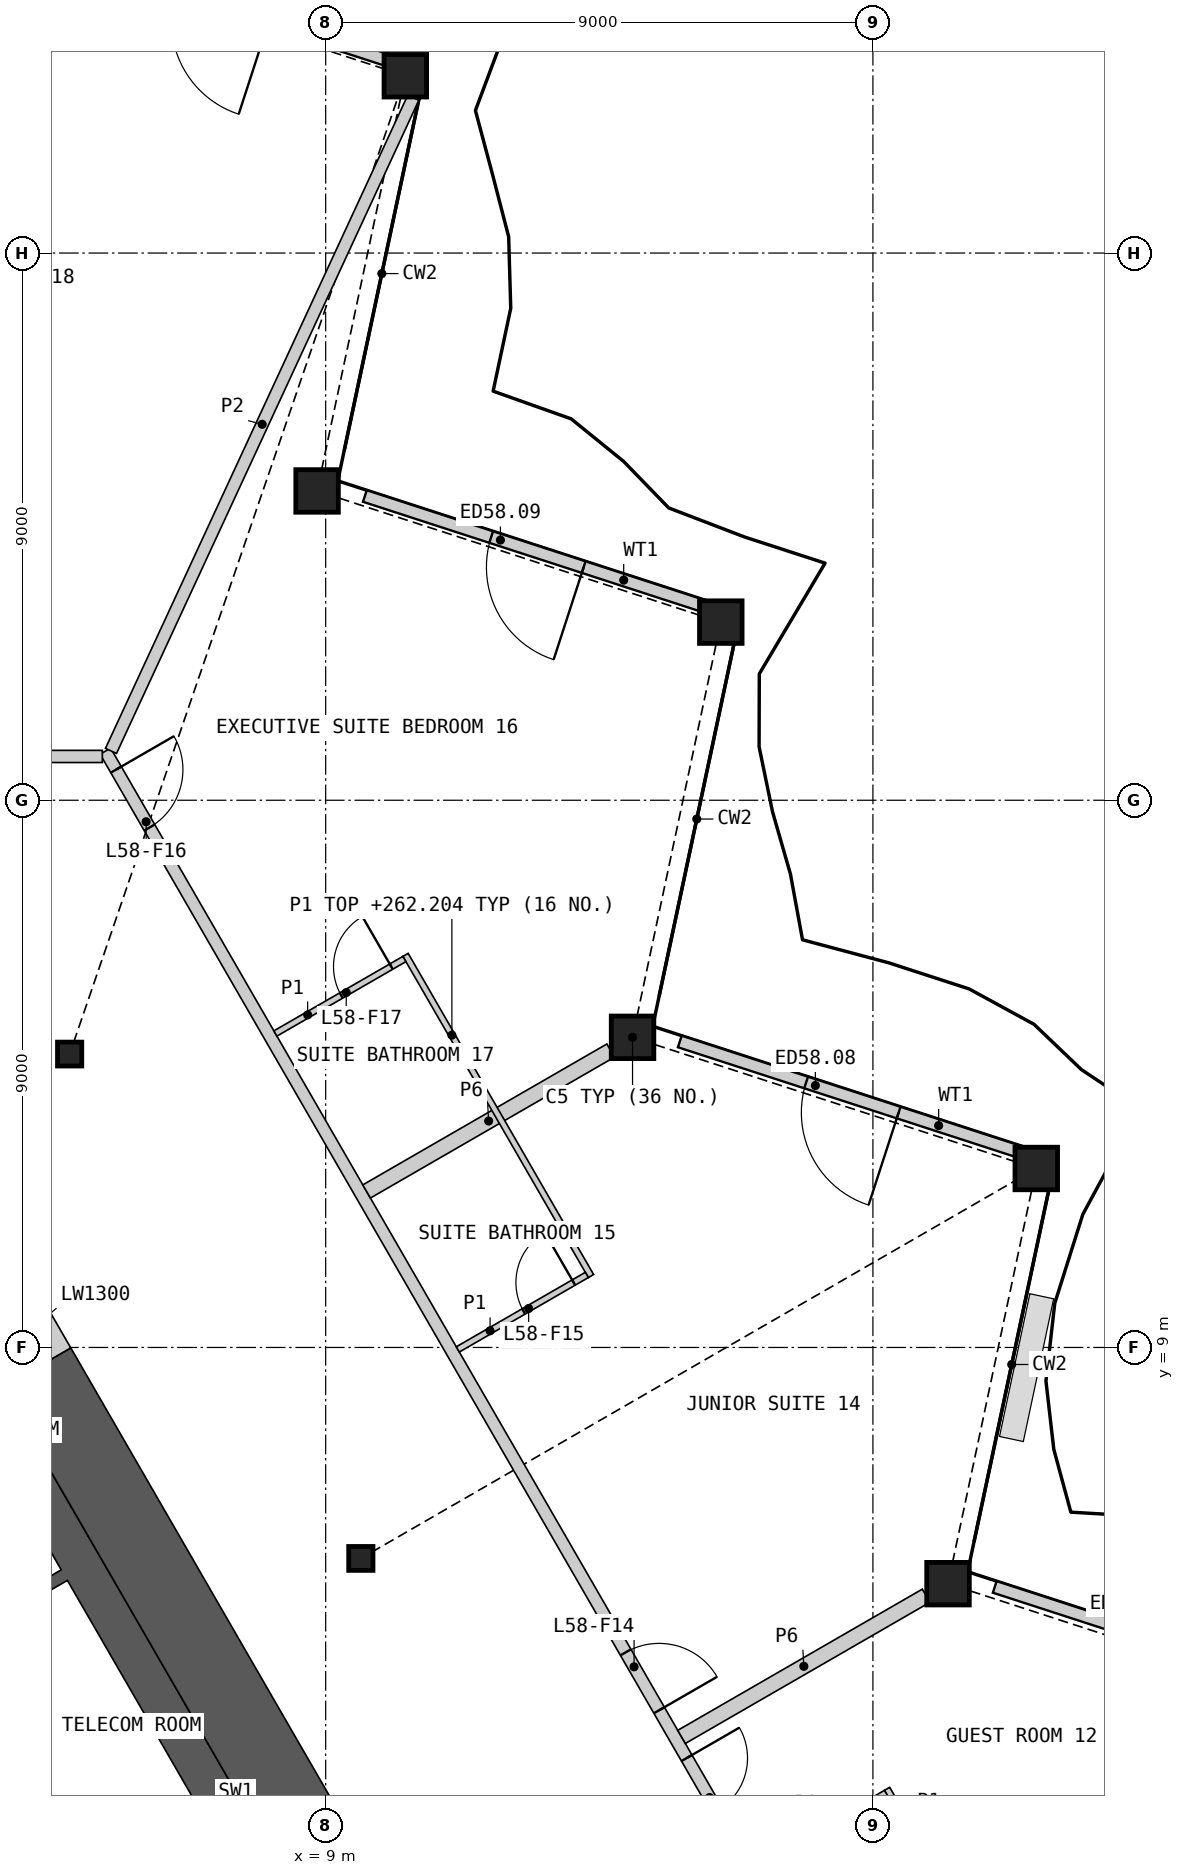
"""IFC4 building model, lengths in metres.
Left out: names, types, materials, properties, quantities, classifications, styles, units other than length and angle.
Written with IfcOpenShell. Run it as: python <this file> out.ifc"""

import sys

from ifc_helpers import new_model, si_unit, direction, frame, frame_2d, origin, origin_2d, place, context, subcontext, project, spatial, polyline, rectangle, hollow_rectangle, i_section, outline, extrude, element, fill, save


model = new_model("IFC4")
c1 = context("Model", 3, precision=1e-05, world=origin(), true_north=direction((0.0, 1.0)))
c2 = subcontext(c1, "Body", "Model", "MODEL_VIEW")
j1 = project(units=[si_unit("LENGTHUNIT", "METRE"), si_unit("PLANEANGLEUNIT", "RADIAN")], contexts=[c1])
p1 = place(None, origin())
s1 = spatial("IfcSite", under=j1, at=p1, CompositionType="ELEMENT")
p2 = place(p1, origin())
s2 = spatial("IfcBuilding", under=s1, at=p2, CompositionType="ELEMENT")
p3 = place(p2, frame((0.0, 0.0, 259.8)))
s3 = spatial("IfcBuildingStorey", under=s2, at=p3, CompositionType="ELEMENT", Elevation=259.8)
for number, where, z_axis, x_axis in (
    (1, (19.235, 5.115, 0.0), (0.0, 0.0, 1.0), (1.0, 0.0, 0.0)),
    (2, (20.687, 11.943, 0.0), (0.0, 0.0, 1.0), (1.0, 0.0, 0.0)),
    (3, (14.047, 14.101, 0.0), (0.0, 0.0, 1.0), (1.0, 0.0, 0.0)),
    (4, (15.499, 20.93, 0.0), (0.0, 0.0, 1.0), (1.0, 0.0, 0.0)),
    (5, (8.859, 23.087, 0.0), (0.0, 0.0, 1.0), (1.0, 0.0, 0.0)),
    (6, (10.31, 29.916, 0.0), (0.0, 0.0, 1.0), (1.0, 0.0, 0.0)),
):
    element("IfcColumn", number, at=place(p3, frame(where, z_axis=z_axis, x_axis=x_axis)), inside=s3, PredefinedType="COLUMN", context=c2, shape_type="SweptSolid", body=[
        extrude(hollow_rectangle(XDim=0.7, YDim=0.7, WallThickness=0.045, at=origin_2d()), origin(), (0.0, 0.0, 1.0), 3.6),
    ])
for number, where, z_axis, x_axis in (
    (7, (9.578, 5.53, 0.0), (0.0, 0.0, 1.0), (1.0, 0.0, 0.0)),
    (8, (4.789, 13.825, 0.0), (0.0, 0.0, 1.0), (1.0, 0.0, 0.0)),
):
    element("IfcColumn", number, at=place(p3, frame(where, z_axis=z_axis, x_axis=x_axis)), inside=s3, PredefinedType="COLUMN", context=c2, shape_type="SweptSolid", body=[
        extrude(i_section(OverallWidth=0.399, OverallDepth=0.393, WebThickness=0.023, FlangeThickness=0.037, at=origin_2d()), origin(), (0.0, 0.0, 1.0), 3.6),
    ])
p4 = place(p3, frame((25.679, 3.217, 0.0), z_axis=(0.0, 0.0, 1.0), x_axis=(-0.951049400374, 0.309038894069, 0.0)))
e9 = element("IfcWall", 9, at=p4, inside=s3, PredefinedType="SOLIDWALL", context=c2, shape_type="SweptSolid", body=[
    extrude(rectangle(XDim=5.968, YDim=0.2, at=frame_2d((2.984, 0.0))), origin(), (0.0, 0.0, 1.0), 2.701),
])
p5 = place(p4, frame((2.184, 0.0, 0.0)))
e10 = element("IfcOpeningElement", 10, at=p5, cuts=e9, PredefinedType="OPENING", context=c2, shape_type="SweptSolid", body=[
    extrude(rectangle(XDim=1.6, YDim=2.4, at=frame_2d((0.8, 1.2))), frame((0.0, 0.11, 0.0), z_axis=(0.0, -1.0, 0.0), x_axis=(1.0, 0.0, 0.0)), (0.0, 0.0, 1.0), 0.22),
])
p6 = place(p3, frame((20.5, 12.188, 0.0), z_axis=(0.0, 0.0, 1.0), x_axis=(-0.951053307318, 0.309026870418, 0.0)))
e11 = element("IfcWall", 11, at=p6, inside=s3, PredefinedType="SOLIDWALL", context=c2, shape_type="SweptSolid", body=[
    extrude(rectangle(XDim=5.968, YDim=0.2, at=frame_2d((2.984, 0.0))), origin(), (0.0, 0.0, 1.0), 2.701),
])
p7 = place(p6, frame((2.184, 0.0, 0.0)))
e12 = element("IfcOpeningElement", 12, at=p7, cuts=e11, PredefinedType="OPENING", context=c2, shape_type="SweptSolid", body=[
    extrude(rectangle(XDim=1.6, YDim=2.4, at=frame_2d((0.8, 1.2))), frame((0.0, 0.11, 0.0), z_axis=(0.0, -1.0, 0.0), x_axis=(1.0, 0.0, 0.0)), (0.0, 0.0, 1.0), 0.22),
])
p8 = place(p3, frame((15.321, 21.159, 0.0), z_axis=(0.0, 0.0, 1.0), x_axis=(-0.951053307318, 0.309026870418, 0.0)))
e13 = element("IfcWall", 13, at=p8, inside=s3, PredefinedType="SOLIDWALL", context=c2, shape_type="SweptSolid", body=[
    extrude(rectangle(XDim=5.968, YDim=0.2, at=frame_2d((2.984, 0.0))), origin(), (0.0, 0.0, 1.0), 2.701),
])
p9 = place(p8, frame((2.184, 0.0, 0.0)))
e14 = element("IfcOpeningElement", 14, at=p9, cuts=e13, PredefinedType="OPENING", context=c2, shape_type="SweptSolid", body=[
    extrude(rectangle(XDim=1.6, YDim=2.4, at=frame_2d((0.8, 1.2))), frame((0.0, 0.11, 0.0), z_axis=(0.0, -1.0, 0.0), x_axis=(1.0, 0.0, 0.0)), (0.0, 0.0, 1.0), 0.22),
])
p10 = place(p3, frame((10.141, 30.131, 0.0), z_axis=(0.0, 0.0, 1.0), x_axis=(-0.951049400374, 0.309038894069, 0.0)))
e15 = element("IfcWall", 15, at=p10, inside=s3, PredefinedType="SOLIDWALL", context=c2, shape_type="SweptSolid", body=[
    extrude(rectangle(XDim=5.968, YDim=0.2, at=frame_2d((2.984, 0.0))), origin(), (0.0, 0.0, 1.0), 2.701),
])
p11 = place(p10, frame((2.184, 0.0, 0.0)))
e16 = element("IfcOpeningElement", 16, at=p11, cuts=e15, PredefinedType="OPENING", context=c2, shape_type="SweptSolid", body=[
    extrude(rectangle(XDim=1.6, YDim=2.4, at=frame_2d((0.8, 1.2))), frame((0.0, 0.11, 0.0), z_axis=(0.0, -1.0, 0.0), x_axis=(1.0, 0.0, 0.0)), (0.0, 0.0, 1.0), 0.22),
])
p12 = place(p3, origin())
e17 = element("IfcWall", 17, at=p12, inside=s3, PredefinedType="SHEAR", context=c2, shape_type="SweptSolid", body=[
    extrude(outline(polyline([(7.524, 1.688), (7.131, 1.461), (4.96, 0.208), (4.861, 0.381), (6.852, 1.531), (4.752, 5.169), (2.76, 4.019), (2.66, 4.192), (4.652, 5.342), (3.652, 7.074), (1.66, 5.924), (1.561, 6.097), (3.731, 7.35), (4.124, 7.577), (7.524, 1.688)])), origin(), (0.0, 0.0, 1.0), 3.25),
])
p13 = place(p3, frame((5.817, -1.476, 0.0), z_axis=(0.0, 0.0, 1.0), x_axis=(-0.500002616675, 0.866023893041, 0.0)))
e18 = element("IfcWall", 18, at=p13, inside=s3, PredefinedType="SOLIDWALL", context=c2, shape_type="SweptSolid", body=[
    extrude(rectangle(XDim=8.373, YDim=0.2, at=frame_2d((4.187, 0.0))), origin(), (0.0, 0.0, 1.0), 3.25),
])
p14 = place(p13, frame((0.437, 0.0, 0.0)))
e19 = element("IfcOpeningElement", 19, at=p14, cuts=e18, PredefinedType="OPENING", context=c2, shape_type="SweptSolid", body=[
    extrude(rectangle(XDim=0.9, YDim=2.1, at=frame_2d((0.45, 1.05))), frame((0.0, 0.11, 0.0), z_axis=(0.0, -1.0, 0.0), x_axis=(1.0, 0.0, 0.0)), (0.0, 0.0, 1.0), 0.22),
])
p15 = place(p13, frame((3.737, 0.0, 0.0)))
e20 = element("IfcOpeningElement", 20, at=p15, cuts=e18, PredefinedType="OPENING", context=c2, shape_type="SweptSolid", body=[
    extrude(rectangle(XDim=0.9, YDim=2.1, at=frame_2d((0.45, 1.05))), frame((0.0, 0.11, 0.0), z_axis=(0.0, -1.0, 0.0), x_axis=(1.0, 0.0, 0.0)), (0.0, 0.0, 1.0), 0.22),
])
p16 = place(p13, frame((6.937, 0.0, 0.0)))
e21 = element("IfcOpeningElement", 21, at=p16, cuts=e18, PredefinedType="OPENING", context=c2, shape_type="SweptSolid", body=[
    extrude(rectangle(XDim=1.1, YDim=2.1, at=frame_2d((0.55, 1.05))), frame((0.0, 0.11, 0.0), z_axis=(0.0, -1.0, 0.0), x_axis=(1.0, 0.0, 0.0)), (0.0, 0.0, 1.0), 0.22),
])
p17 = place(p3, frame((10.081, -1.441, 0.0), z_axis=(0.0, 0.0, 1.0), x_axis=(-0.500006109471, 0.866021876451, 0.0)))
e22 = element("IfcWall", 22, at=p17, inside=s3, PredefinedType="SHEAR", context=c2, shape_type="SweptSolid", body=[
    extrude(rectangle(XDim=11.672, YDim=1.3, at=frame_2d((5.836, 0.0))), origin(), (0.0, 0.0, 1.0), 3.25),
])
p18 = place(p3, frame((4.245, 8.668, 0.0), z_axis=(0.0, 0.0, 1.0), x_axis=(-0.50002983664, 0.866008176907, 0.0)))
e23 = element("IfcWall", 23, at=p18, inside=s3, PredefinedType="SHEAR", context=c2, shape_type="SweptSolid", body=[
    extrude(rectangle(XDim=2.2, YDim=1.3, at=frame_2d((1.1, 0.0))), origin(), (0.0, 0.0, 1.0), 3.25),
])
p19 = place(p18, frame((0.6, 0.0, 0.0)))
e24 = element("IfcOpeningElement", 24, at=p19, cuts=e23, PredefinedType="OPENING", context=c2, shape_type="SweptSolid", body=[
    extrude(rectangle(XDim=1.0, YDim=2.1, at=frame_2d((0.5, 1.05))), frame((0.0, 0.66, 0.0), z_axis=(0.0, -1.0, 0.0), x_axis=(1.0, 0.0, 0.0)), (0.0, 0.0, 1.0), 1.32),
])
p20 = place(p3, frame((5.377, 18.807, 0.0), z_axis=(0.0, 0.0, 1.0), x_axis=(0.499999852422, -0.866025488988, 0.0)))
e25 = element("IfcWall", 25, at=p20, inside=s3, PredefinedType="PARTITIONING", context=c2, shape_type="SweptSolid", body=[
    extrude(rectangle(XDim=27.198, YDim=0.2, at=frame_2d((13.599, 0.0))), origin(), (0.0, 0.0, 1.0), 3.25),
])
p21 = place(p20, frame((25.096, 0.0, 0.0)))
e26 = element("IfcOpeningElement", 26, at=p21, cuts=e25, PredefinedType="OPENING", context=c2, shape_type="SweptSolid", body=[
    extrude(rectangle(XDim=0.95, YDim=2.1, at=frame_2d((0.475, 1.05))), frame((0.0, 0.11, 0.0), z_axis=(0.0, -1.0, 0.0), x_axis=(1.0, 0.0, 0.0)), (0.0, 0.0, 1.0), 0.22),
])
p22 = place(p20, frame((19.122, 0.0, 0.0)))
e27 = element("IfcOpeningElement", 27, at=p22, cuts=e25, PredefinedType="OPENING", context=c2, shape_type="SweptSolid", body=[
    extrude(rectangle(XDim=1.0, YDim=2.1, at=frame_2d((0.5, 1.05))), frame((0.0, 0.11, 0.0), z_axis=(0.0, -1.0, 0.0), x_axis=(1.0, 0.0, 0.0)), (0.0, 0.0, 1.0), 0.22),
])
p23 = place(p20, frame((17.115, 0.0, 0.0)))
e28 = element("IfcOpeningElement", 28, at=p23, cuts=e25, PredefinedType="OPENING", context=c2, shape_type="SweptSolid", body=[
    extrude(rectangle(XDim=1.1, YDim=2.1, at=frame_2d((0.55, 1.05))), frame((0.0, 0.11, 0.0), z_axis=(0.0, -1.0, 0.0), x_axis=(1.0, 0.0, 0.0)), (0.0, 0.0, 1.0), 0.22),
])
p24 = place(p20, frame((0.35, 0.0, 0.0)))
e29 = element("IfcOpeningElement", 29, at=p24, cuts=e25, PredefinedType="OPENING", context=c2, shape_type="SweptSolid", body=[
    extrude(rectangle(XDim=1.1, YDim=2.1, at=frame_2d((0.55, 1.05))), frame((0.0, 0.11, 0.0), z_axis=(0.0, -1.0, 0.0), x_axis=(1.0, 0.0, 0.0)), (0.0, 0.0, 1.0), 0.22),
])
p25 = place(p3, frame((14.853, 2.594, 0.0), z_axis=(0.0, 0.0, 1.0), x_axis=(0.866021891294, 0.500006083763, 0.0)))
e30 = element("IfcWall", 30, at=p25, inside=s3, PredefinedType="PARTITIONING", context=c2, shape_type="SweptSolid", body=[
    extrude(rectangle(XDim=4.645, YDim=0.25, at=frame_2d((2.322, 0.0))), origin(), (0.0, 0.0, 1.0), 2.404),
])
p26 = place(p3, frame((9.673, 11.566, 0.0), z_axis=(0.0, 0.0, 1.0), x_axis=(0.866039966287, 0.499974776157, 0.0)))
e31 = element("IfcWall", 31, at=p26, inside=s3, PredefinedType="PARTITIONING", context=c2, shape_type="SweptSolid", body=[
    extrude(rectangle(XDim=4.635, YDim=0.25, at=frame_2d((2.317, 0.0))), origin(), (0.0, 0.0, 1.0), 2.404),
])
p27 = place(p3, frame((2.325, 18.72, 0.0), z_axis=(0.0, 0.0, 1.0), x_axis=(1.0, 0.0, 0.0)))
e32 = element("IfcWall", 32, at=p27, inside=s3, PredefinedType="PARTITIONING", context=c2, shape_type="SweptSolid", body=[
    extrude(rectangle(XDim=3.002, YDim=0.2, at=frame_2d((1.501, 0.0))), origin(), (0.0, 0.0, 1.0), 3.25),
])
p28 = place(p3, frame((5.469, 18.811, 0.0), z_axis=(0.0, 0.0, 1.0), x_axis=(0.419996836618, 0.907525568362, 0.0)))
e33 = element("IfcWall", 33, at=p28, inside=s3, PredefinedType="PARTITIONING", context=c2, shape_type="SweptSolid", body=[
    extrude(rectangle(XDim=11.84, YDim=0.2, at=frame_2d((5.92, 0.0))), origin(), (0.0, 0.0, 1.0), 2.404),
])
p29 = place(p3, frame((17.443, -1.891, 0.0), z_axis=(0.0, 0.0, 1.0), x_axis=(0.866019838429, 0.500009639354, 0.0)))
e34 = element("IfcWall", 34, at=p29, inside=s3, PredefinedType="PARTITIONING", context=c2, shape_type="SweptSolid", body=[
    extrude(rectangle(XDim=9.321, YDim=0.2, at=frame_2d((4.661, 0.0))), origin(), (0.0, 0.0, 1.0), 2.404),
])
p30 = place(p3, frame((10.313, 15.457, 0.0), z_axis=(0.0, 0.0, 1.0), x_axis=(0.499978833458, -0.866037623948, 0.0)))
e35 = element("IfcWall", 35, at=p30, inside=s3, PredefinedType="PARTITIONING", context=c2, shape_type="SweptSolid", body=[
    extrude(rectangle(XDim=6.1, YDim=0.1, at=frame_2d((3.05, 0.0))), origin(), (0.0, 0.0, 1.0), 2.404),
])
p31 = place(p3, frame((18.233, 1.74, 0.0), z_axis=(0.0, 0.0, 1.0), x_axis=(0.499993606316, -0.866029095148, 0.0)))
e36 = element("IfcWall", 36, at=p31, inside=s3, PredefinedType="PARTITIONING", context=c2, shape_type="SweptSolid", body=[
    extrude(rectangle(XDim=2.65, YDim=0.1, at=frame_2d((1.325, 0.0))), origin(), (0.0, 0.0, 1.0), 2.404),
])
p32 = place(p31, frame((1.341, 0.0, 0.0)))
e37 = element("IfcOpeningElement", 37, at=p32, cuts=e36, PredefinedType="OPENING", context=c2, shape_type="SweptSolid", body=[
    extrude(rectangle(XDim=0.95, YDim=2.1, at=frame_2d((0.475, 1.05))), frame((0.0, 0.06, 0.0), z_axis=(0.0, -1.0, 0.0), x_axis=(1.0, 0.0, 0.0)), (0.0, 0.0, 1.0), 0.12),
])
p33 = place(p3, frame((16.093, 0.447, 0.0), z_axis=(0.0, 0.0, 1.0), x_axis=(0.866057815567, 0.499943856944, 0.0)))
e38 = element("IfcWall", 38, at=p33, inside=s3, PredefinedType="PARTITIONING", context=c2, shape_type="SweptSolid", body=[
    extrude(rectangle(XDim=2.45, YDim=0.1, at=frame_2d((1.225, 0.0))), origin(), (0.0, 0.0, 1.0), 2.404),
])
p34 = place(p3, frame((11.173, 8.968, 0.0), z_axis=(0.0, 0.0, 1.0), x_axis=(0.866014668023, 0.500018594424, 0.0)))
e39 = element("IfcWall", 39, at=p34, inside=s3, PredefinedType="PARTITIONING", context=c2, shape_type="SweptSolid", body=[
    extrude(rectangle(XDim=2.45, YDim=0.1, at=frame_2d((1.225, 0.0))), origin(), (0.0, 0.0, 1.0), 2.404),
])
p35 = place(p34, frame((1.25, 0.0, 0.0)))
e40 = element("IfcOpeningElement", 40, at=p35, cuts=e39, PredefinedType="OPENING", context=c2, shape_type="SweptSolid", body=[
    extrude(rectangle(XDim=0.95, YDim=2.1, at=frame_2d((0.475, 1.05))), frame((0.0, 0.06, 0.0), z_axis=(0.0, -1.0, 0.0), x_axis=(1.0, 0.0, 0.0)), (0.0, 0.0, 1.0), 0.12),
])
p36 = place(p3, frame((8.173, 14.164, 0.0), z_axis=(0.0, 0.0, 1.0), x_axis=(0.866014668023, 0.500018594424, 0.0)))
e41 = element("IfcWall", 41, at=p36, inside=s3, PredefinedType="PARTITIONING", context=c2, shape_type="SweptSolid", body=[
    extrude(rectangle(XDim=2.45, YDim=0.1, at=frame_2d((1.225, 0.0))), origin(), (0.0, 0.0, 1.0), 2.404),
])
p37 = place(p36, frame((1.25, 0.0, 0.0)))
e42 = element("IfcOpeningElement", 42, at=p37, cuts=e41, PredefinedType="OPENING", context=c2, shape_type="SweptSolid", body=[
    extrude(rectangle(XDim=0.95, YDim=2.1, at=frame_2d((0.475, 1.05))), frame((0.0, 0.06, 0.0), z_axis=(0.0, -1.0, 0.0), x_axis=(1.0, 0.0, 0.0)), (0.0, 0.0, 1.0), 0.12),
])
p38 = place(p7, origin())
e43 = element("IfcDoor", 43, at=p38, inside=s3, OperationType="DOUBLE_DOOR_SINGLE_SWING", PredefinedType="DOOR", context=c2, shape_type="SweptSolid", body=[
    extrude(rectangle(XDim=1.6, YDim=2.4, at=frame_2d((0.8, 1.2))), frame((0.0, 0.025, 0.0), z_axis=(0.0, -1.0, 0.0), x_axis=(1.0, 0.0, 0.0)), (0.0, 0.0, 1.0), 0.05),
])
fill(e12, e43)
p39 = place(p9, origin())
e44 = element("IfcDoor", 44, at=p39, inside=s3, OperationType="DOUBLE_DOOR_SINGLE_SWING", PredefinedType="DOOR", context=c2, shape_type="SweptSolid", body=[
    extrude(rectangle(XDim=1.6, YDim=2.4, at=frame_2d((0.8, 1.2))), frame((0.0, 0.025, 0.0), z_axis=(0.0, -1.0, 0.0), x_axis=(1.0, 0.0, 0.0)), (0.0, 0.0, 1.0), 0.05),
])
fill(e14, e44)
p40 = place(p22, origin())
e45 = element("IfcDoor", 45, at=p40, inside=s3, OperationType="SINGLE_SWING_LEFT", PredefinedType="DOOR", context=c2, shape_type="SweptSolid", body=[
    extrude(rectangle(XDim=1.0, YDim=2.1, at=frame_2d((0.5, 1.05))), frame((0.0, 0.025, 0.0), z_axis=(0.0, -1.0, 0.0), x_axis=(1.0, 0.0, 0.0)), (0.0, 0.0, 1.0), 0.05),
])
fill(e27, e45)
p41 = place(p23, origin())
e46 = element("IfcDoor", 46, at=p41, inside=s3, OperationType="SINGLE_SWING_RIGHT", PredefinedType="DOOR", context=c2, shape_type="SweptSolid", body=[
    extrude(rectangle(XDim=1.1, YDim=2.1, at=frame_2d((0.55, 1.05))), frame((0.0, 0.025, 0.0), z_axis=(0.0, -1.0, 0.0), x_axis=(1.0, 0.0, 0.0)), (0.0, 0.0, 1.0), 0.05),
])
fill(e28, e46)
p42 = place(p35, origin())
e47 = element("IfcDoor", 47, at=p42, inside=s3, OperationType="SINGLE_SWING_RIGHT", PredefinedType="DOOR", context=c2, shape_type="SweptSolid", body=[
    extrude(rectangle(XDim=0.95, YDim=2.1, at=frame_2d((0.475, 1.05))), frame((0.0, 0.025, 0.0), z_axis=(0.0, -1.0, 0.0), x_axis=(1.0, 0.0, 0.0)), (0.0, 0.0, 1.0), 0.05),
])
fill(e40, e47)
p43 = place(p24, origin())
e48 = element("IfcDoor", 48, at=p43, inside=s3, OperationType="SINGLE_SWING_LEFT", PredefinedType="DOOR", context=c2, shape_type="SweptSolid", body=[
    extrude(rectangle(XDim=1.1, YDim=2.1, at=frame_2d((0.55, 1.05))), frame((0.0, 0.025, 0.0), z_axis=(0.0, -1.0, 0.0), x_axis=(1.0, 0.0, 0.0)), (0.0, 0.0, 1.0), 0.05),
])
fill(e29, e48)
p44 = place(p37, origin())
e49 = element("IfcDoor", 49, at=p44, inside=s3, OperationType="SINGLE_SWING_RIGHT", PredefinedType="DOOR", context=c2, shape_type="SweptSolid", body=[
    extrude(rectangle(XDim=0.95, YDim=2.1, at=frame_2d((0.475, 1.05))), frame((0.0, 0.025, 0.0), z_axis=(0.0, -1.0, 0.0), x_axis=(1.0, 0.0, 0.0)), (0.0, 0.0, 1.0), 0.05),
])
fill(e42, e49)
save(model, sys.argv[1])
